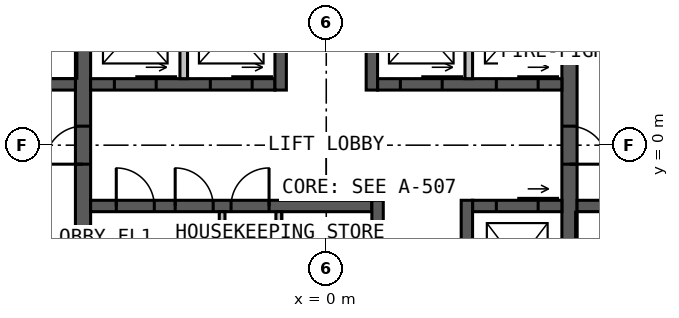
"""IFC4 building model, lengths in metres.
Left out: names, types, materials, properties, quantities, classifications, styles, units other than length and angle.
Written with IfcOpenShell. Run it as: python <this file> out.ifc"""

import sys

from ifc_helpers import new_model, si_unit, direction, frame, frame_2d, origin, place, context, subcontext, project, spatial, rectangle, extrude, element, fill, save


model = new_model("IFC4")
c1 = context("Model", 3, precision=1e-05, world=origin(), true_north=direction((0.0, 1.0)))
c2 = subcontext(c1, "Body", "Model", "MODEL_VIEW")
j1 = project(units=[si_unit("LENGTHUNIT", "METRE"), si_unit("PLANEANGLEUNIT", "RADIAN")], contexts=[c1])
p1 = place(None, origin())
s1 = spatial("IfcSite", under=j1, at=p1, CompositionType="ELEMENT")
p2 = place(p1, origin())
s2 = spatial("IfcBuilding", under=s1, at=p2, CompositionType="ELEMENT")
p3 = place(p2, frame((0.0, 0.0, 248.0)))
s3 = spatial("IfcBuildingStorey", under=s2, at=p3, CompositionType="ELEMENT", Elevation=248.0)
p4 = place(p3, frame((-6.4, -9.6, 0.0), z_axis=(0.0, 0.0, 1.0), x_axis=(0.0, 1.0, 0.0)))
e1 = element("IfcWall", 1, at=p4, inside=s3, PredefinedType="SOLIDWALL", context=c2, shape_type="SweptSolid", body=[
    extrude(rectangle(XDim=19.2, YDim=0.4, at=frame_2d((9.6, 0.0))), origin(), (0.0, 0.0, 1.0), 4.0),
])
p5 = place(p4, frame((9.1, 0.0, 0.0)))
e2 = element("IfcOpeningElement", 2, at=p5, cuts=e1, PredefinedType="OPENING", context=c2, shape_type="SweptSolid", body=[
    extrude(rectangle(XDim=1.0, YDim=2.2, at=frame_2d((0.5, 1.1))), frame((0.0, 0.21, 0.0), z_axis=(0.0, -1.0, 0.0), x_axis=(1.0, 0.0, 0.0)), (0.0, 0.0, 1.0), 0.42),
])
p6 = place(p3, frame((6.4, 9.6, 0.0), z_axis=(0.0, 0.0, 1.0), x_axis=(0.0, -1.0, 0.0)))
e3 = element("IfcWall", 3, at=p6, inside=s3, PredefinedType="SOLIDWALL", context=c2, shape_type="SweptSolid", body=[
    extrude(rectangle(XDim=19.2, YDim=0.4, at=frame_2d((9.6, 0.0))), origin(), (0.0, 0.0, 1.0), 4.0),
])
p7 = place(p6, frame((9.1, 0.0, 0.0)))
e4 = element("IfcOpeningElement", 4, at=p7, cuts=e3, PredefinedType="OPENING", context=c2, shape_type="SweptSolid", body=[
    extrude(rectangle(XDim=1.0, YDim=2.2, at=frame_2d((0.5, 1.1))), frame((0.0, 0.21, 0.0), z_axis=(0.0, -1.0, 0.0), x_axis=(1.0, 0.0, 0.0)), (0.0, 0.0, 1.0), 0.42),
])
p8 = place(p3, frame((-6.2, 1.6, 0.0), z_axis=(0.0, 0.0, 1.0), x_axis=(1.0, 0.0, 0.0)))
e5 = element("IfcWall", 5, at=p8, inside=s3, PredefinedType="SOLIDWALL", context=c2, shape_type="SweptSolid", body=[
    extrude(rectangle(XDim=4.85, YDim=0.3, at=frame_2d((2.425, 0.0))), origin(), (0.0, 0.0, 1.0), 4.0),
])
p9 = place(p8, frame((0.625, 0.0, 0.0)))
e6 = element("IfcOpeningElement", 6, at=p9, cuts=e5, PredefinedType="OPENING", context=c2, shape_type="SweptSolid", body=[
    extrude(rectangle(XDim=1.1, YDim=2.2, at=frame_2d((0.55, 1.1))), frame((0.0, 0.16, 0.0), z_axis=(0.0, -1.0, 0.0), x_axis=(1.0, 0.0, 0.0)), (0.0, 0.0, 1.0), 0.32),
])
p10 = place(p8, frame((3.15, 0.0, 0.0)))
e7 = element("IfcOpeningElement", 7, at=p10, cuts=e5, PredefinedType="OPENING", context=c2, shape_type="SweptSolid", body=[
    extrude(rectangle(XDim=1.1, YDim=2.2, at=frame_2d((0.55, 1.1))), frame((0.0, 0.16, 0.0), z_axis=(0.0, -1.0, 0.0), x_axis=(1.0, 0.0, 0.0)), (0.0, 0.0, 1.0), 0.32),
])
p11 = place(p3, frame((1.35, 1.6, 0.0), z_axis=(0.0, 0.0, 1.0), x_axis=(1.0, 0.0, 0.0)))
e8 = element("IfcWall", 8, at=p11, inside=s3, PredefinedType="SOLIDWALL", context=c2, shape_type="SweptSolid", body=[
    extrude(rectangle(XDim=4.85, YDim=0.3, at=frame_2d((2.425, 0.0))), origin(), (0.0, 0.0, 1.0), 4.0),
])
p12 = place(p11, frame((0.6, 0.0, 0.0)))
e9 = element("IfcOpeningElement", 9, at=p12, cuts=e8, PredefinedType="OPENING", context=c2, shape_type="SweptSolid", body=[
    extrude(rectangle(XDim=1.1, YDim=2.2, at=frame_2d((0.55, 1.1))), frame((0.0, 0.16, 0.0), z_axis=(0.0, -1.0, 0.0), x_axis=(1.0, 0.0, 0.0)), (0.0, 0.0, 1.0), 0.32),
])
p13 = place(p11, frame((3.125, 0.0, 0.0)))
e10 = element("IfcOpeningElement", 10, at=p13, cuts=e8, PredefinedType="OPENING", context=c2, shape_type="SweptSolid", body=[
    extrude(rectangle(XDim=1.1, YDim=2.2, at=frame_2d((0.55, 1.1))), frame((0.0, 0.16, 0.0), z_axis=(0.0, -1.0, 0.0), x_axis=(1.0, 0.0, 0.0)), (0.0, 0.0, 1.0), 0.32),
])
p14 = place(p3, frame((-1.2, 1.45, 0.0), z_axis=(0.0, 0.0, 1.0), x_axis=(0.0, 1.0, 0.0)))
e11 = element("IfcWall", 11, at=p14, inside=s3, PredefinedType="SOLIDWALL", context=c2, shape_type="SweptSolid", body=[
    extrude(rectangle(XDim=8.15, YDim=0.3, at=frame_2d((4.075, 0.0))), origin(), (0.0, 0.0, 1.0), 4.0),
])
p15 = place(p14, frame((5.05, 0.0, 0.0)))
e12 = element("IfcOpeningElement", 12, at=p15, cuts=e11, PredefinedType="OPENING", context=c2, shape_type="SweptSolid", body=[
    extrude(rectangle(XDim=1.0, YDim=2.2, at=frame_2d((0.5, 1.1))), frame((0.0, 0.16, 0.0), z_axis=(0.0, -1.0, 0.0), x_axis=(1.0, 0.0, 0.0)), (0.0, 0.0, 1.0), 0.32),
])
p16 = place(p3, frame((1.2, 1.45, 0.0), z_axis=(0.0, 0.0, 1.0), x_axis=(0.0, 1.0, 0.0)))
e13 = element("IfcWall", 13, at=p16, inside=s3, PredefinedType="SOLIDWALL", context=c2, shape_type="SweptSolid", body=[
    extrude(rectangle(XDim=8.15, YDim=0.3, at=frame_2d((4.075, 0.0))), origin(), (0.0, 0.0, 1.0), 4.0),
])
p17 = place(p16, frame((3.8, 0.0, 0.0)))
e14 = element("IfcOpeningElement", 14, at=p17, cuts=e13, PredefinedType="OPENING", context=c2, shape_type="SweptSolid", body=[
    extrude(rectangle(XDim=1.0, YDim=2.2, at=frame_2d((0.5, 1.1))), frame((0.0, 0.16, 0.0), z_axis=(0.0, -1.0, 0.0), x_axis=(1.0, 0.0, 0.0)), (0.0, 0.0, 1.0), 0.32),
])
p18 = place(p16, frame((6.15, 0.0, 0.0)))
e15 = element("IfcOpeningElement", 15, at=p18, cuts=e13, PredefinedType="OPENING", context=c2, shape_type="SweptSolid", body=[
    extrude(rectangle(XDim=1.0, YDim=2.2, at=frame_2d((0.5, 1.1))), frame((0.0, 0.16, 0.0), z_axis=(0.0, -1.0, 0.0), x_axis=(1.0, 0.0, 0.0)), (0.0, 0.0, 1.0), 0.32),
])
p19 = place(p3, frame((-6.2, -1.6, 0.0), z_axis=(0.0, 0.0, 1.0), x_axis=(1.0, 0.0, 0.0)))
e16 = element("IfcWall", 16, at=p19, inside=s3, PredefinedType="SOLIDWALL", context=c2, shape_type="SweptSolid", body=[
    extrude(rectangle(XDim=7.4, YDim=0.3, at=frame_2d((3.7, 0.0))), origin(), (0.0, 0.0, 1.0), 4.0),
])
p20 = place(p19, frame((0.675, 0.0, 0.0)))
e17 = element("IfcOpeningElement", 17, at=p20, cuts=e16, PredefinedType="OPENING", context=c2, shape_type="SweptSolid", body=[
    extrude(rectangle(XDim=1.0, YDim=2.2, at=frame_2d((0.5, 1.1))), frame((0.0, 0.16, 0.0), z_axis=(0.0, -1.0, 0.0), x_axis=(1.0, 0.0, 0.0)), (0.0, 0.0, 1.0), 0.32),
])
p21 = place(p19, frame((2.225, 0.0, 0.0)))
e18 = element("IfcOpeningElement", 18, at=p21, cuts=e16, PredefinedType="OPENING", context=c2, shape_type="SweptSolid", body=[
    extrude(rectangle(XDim=1.0, YDim=2.2, at=frame_2d((0.5, 1.1))), frame((0.0, 0.16, 0.0), z_axis=(0.0, -1.0, 0.0), x_axis=(1.0, 0.0, 0.0)), (0.0, 0.0, 1.0), 0.32),
])
p22 = place(p19, frame((3.695, 0.0, 0.0)))
e19 = element("IfcOpeningElement", 19, at=p22, cuts=e16, PredefinedType="OPENING", context=c2, shape_type="SweptSolid", body=[
    extrude(rectangle(XDim=1.0, YDim=2.2, at=frame_2d((0.5, 1.1))), frame((0.0, 0.16, 0.0), z_axis=(0.0, -1.0, 0.0), x_axis=(1.0, 0.0, 0.0)), (0.0, 0.0, 1.0), 0.32),
])
p23 = place(p3, frame((3.85, -1.6, 0.0), z_axis=(0.0, 0.0, 1.0), x_axis=(1.0, 0.0, 0.0)))
e20 = element("IfcWall", 20, at=p23, inside=s3, PredefinedType="SOLIDWALL", context=c2, shape_type="SweptSolid", body=[
    extrude(rectangle(XDim=2.35, YDim=0.3, at=frame_2d((1.175, 0.0))), origin(), (0.0, 0.0, 1.0), 4.0),
])
p24 = place(p23, frame((0.625, 0.0, 0.0)))
e21 = element("IfcOpeningElement", 21, at=p24, cuts=e20, PredefinedType="OPENING", context=c2, shape_type="SweptSolid", body=[
    extrude(rectangle(XDim=1.1, YDim=2.2, at=frame_2d((0.55, 1.1))), frame((0.0, 0.16, 0.0), z_axis=(0.0, -1.0, 0.0), x_axis=(1.0, 0.0, 0.0)), (0.0, 0.0, 1.0), 0.32),
])
p25 = place(p3, frame((1.35, -1.45, 0.0), z_axis=(0.0, 0.0, 1.0), x_axis=(0.0, -1.0, 0.0)))
e22 = element("IfcWall", 22, at=p25, inside=s3, PredefinedType="SOLIDWALL", context=c2, shape_type="SweptSolid", body=[
    extrude(rectangle(XDim=8.15, YDim=0.3, at=frame_2d((4.075, 0.0))), origin(), (0.0, 0.0, 1.0), 4.0),
])
p26 = place(p25, frame((6.0, 0.0, 0.0)))
e23 = element("IfcOpeningElement", 23, at=p26, cuts=e22, PredefinedType="OPENING", context=c2, shape_type="SweptSolid", body=[
    extrude(rectangle(XDim=1.0, YDim=2.2, at=frame_2d((0.5, 1.1))), frame((0.0, 0.16, 0.0), z_axis=(0.0, -1.0, 0.0), x_axis=(1.0, 0.0, 0.0)), (0.0, 0.0, 1.0), 0.32),
])
p27 = place(p25, frame((3.525, 0.0, 0.0)))
e24 = element("IfcOpeningElement", 24, at=p27, cuts=e22, PredefinedType="OPENING", context=c2, shape_type="SweptSolid", body=[
    extrude(rectangle(XDim=0.9, YDim=2.2, at=frame_2d((0.45, 1.1))), frame((0.0, 0.16, 0.0), z_axis=(0.0, -1.0, 0.0), x_axis=(1.0, 0.0, 0.0)), (0.0, 0.0, 1.0), 0.32),
])
p28 = place(p3, frame((3.7, -1.45, 0.0), z_axis=(0.0, 0.0, 1.0), x_axis=(0.0, -1.0, 0.0)))
e25 = element("IfcWall", 25, at=p28, inside=s3, PredefinedType="SOLIDWALL", context=c2, shape_type="SweptSolid", body=[
    extrude(rectangle(XDim=8.15, YDim=0.3, at=frame_2d((4.075, 0.0))), origin(), (0.0, 0.0, 1.0), 4.0),
])
p29 = place(p28, frame((5.1, 0.0, 0.0)))
e26 = element("IfcOpeningElement", 26, at=p29, cuts=e25, PredefinedType="OPENING", context=c2, shape_type="SweptSolid", body=[
    extrude(rectangle(XDim=0.9, YDim=2.2, at=frame_2d((0.45, 1.1))), frame((0.0, 0.16, 0.0), z_axis=(0.0, -1.0, 0.0), x_axis=(1.0, 0.0, 0.0)), (0.0, 0.0, 1.0), 0.32),
])
p30 = place(p3, frame((-9.6, 1.6, 0.0), z_axis=(0.0, 0.0, 1.0), x_axis=(1.0, 0.0, 0.0)))
e27 = element("IfcWall", 27, at=p30, inside=s3, PredefinedType="SOLIDWALL", context=c2, shape_type="SweptSolid", body=[
    extrude(rectangle(XDim=3.0, YDim=0.3, at=frame_2d((1.5, 0.0))), origin(), (0.0, 0.0, 1.0), 4.0),
])
p31 = place(p30, frame((1.0, 0.0, 0.0)))
e28 = element("IfcOpeningElement", 28, at=p31, cuts=e27, PredefinedType="OPENING", context=c2, shape_type="SweptSolid", body=[
    extrude(rectangle(XDim=1.0, YDim=2.2, at=frame_2d((0.5, 1.1))), frame((0.0, 0.16, 0.0), z_axis=(0.0, -1.0, 0.0), x_axis=(1.0, 0.0, 0.0)), (0.0, 0.0, 1.0), 0.32),
])
p32 = place(p3, frame((6.6, -1.6, 0.0), z_axis=(0.0, 0.0, 1.0), x_axis=(1.0, 0.0, 0.0)))
e29 = element("IfcWall", 29, at=p32, inside=s3, PredefinedType="SOLIDWALL", context=c2, shape_type="SweptSolid", body=[
    extrude(rectangle(XDim=3.0, YDim=0.3, at=frame_2d((1.5, 0.0))), origin(), (0.0, 0.0, 1.0), 4.0),
])
p33 = place(p32, frame((1.0, 0.0, 0.0)))
e30 = element("IfcOpeningElement", 30, at=p33, cuts=e29, PredefinedType="OPENING", context=c2, shape_type="SweptSolid", body=[
    extrude(rectangle(XDim=1.0, YDim=2.2, at=frame_2d((0.5, 1.1))), frame((0.0, 0.16, 0.0), z_axis=(0.0, -1.0, 0.0), x_axis=(1.0, 0.0, 0.0)), (0.0, 0.0, 1.0), 0.32),
])
for number, where, z_axis, x_axis in (
    (31, (-3.75, 1.75, 0.0), (0.0, 0.0, 1.0), (0.0, 1.0, 0.0)),
    (32, (3.75, 1.75, 0.0), (0.0, 0.0, 1.0), (0.0, 1.0, 0.0)),
):
    element("IfcWall", number, at=place(p3, frame(where, z_axis=z_axis, x_axis=x_axis)), inside=s3, PredefinedType="SOLIDWALL", context=c2, shape_type="SweptSolid", body=[
        extrude(rectangle(XDim=2.7, YDim=0.2, at=frame_2d((1.35, 0.0))), origin(), (0.0, 0.0, 1.0), 3.75),
    ])
for number, where, z_axis, x_axis in (
    (33, (-2.74, -1.75, 0.0), (0.0, 0.0, 1.0), (0.0, -1.0, 0.0)),
    (34, (-1.25, -1.75, 0.0), (0.0, 0.0, 1.0), (0.0, -1.0, 0.0)),
):
    element("IfcWall", number, at=place(p3, frame(where, z_axis=z_axis, x_axis=x_axis)), inside=s3, PredefinedType="PARTITIONING", context=c2, shape_type="SweptSolid", body=[
        extrude(rectangle(XDim=2.7, YDim=0.15, at=frame_2d((1.35, 0.0))), origin(), (0.0, 0.0, 1.0), 3.75),
    ])
p34 = place(p5, origin())
e35 = element("IfcDoor", 35, at=p34, inside=s3, OperationType="SINGLE_SWING_LEFT", PredefinedType="DOOR", context=c2, shape_type="SweptSolid", body=[
    extrude(rectangle(XDim=1.0, YDim=2.2, at=frame_2d((0.5, 1.1))), frame((0.0, 0.025, 0.0), z_axis=(0.0, -1.0, 0.0), x_axis=(1.0, 0.0, 0.0)), (0.0, 0.0, 1.0), 0.05),
])
fill(e2, e35)
p35 = place(p7, origin())
e36 = element("IfcDoor", 36, at=p35, inside=s3, OperationType="SINGLE_SWING_RIGHT", PredefinedType="DOOR", context=c2, shape_type="SweptSolid", body=[
    extrude(rectangle(XDim=1.0, YDim=2.2, at=frame_2d((0.5, 1.1))), frame((0.0, 0.025, 0.0), z_axis=(0.0, -1.0, 0.0), x_axis=(1.0, 0.0, 0.0)), (0.0, 0.0, 1.0), 0.05),
])
fill(e4, e36)
p36 = place(p20, origin())
e37 = element("IfcDoor", 37, at=p36, inside=s3, OperationType="SINGLE_SWING_LEFT", PredefinedType="DOOR", context=c2, shape_type="SweptSolid", body=[
    extrude(rectangle(XDim=1.0, YDim=2.2, at=frame_2d((0.5, 1.1))), frame((0.0, 0.025, 0.0), z_axis=(0.0, -1.0, 0.0), x_axis=(1.0, 0.0, 0.0)), (0.0, 0.0, 1.0), 0.05),
])
fill(e17, e37)
p37 = place(p21, origin())
e38 = element("IfcDoor", 38, at=p37, inside=s3, OperationType="SINGLE_SWING_LEFT", PredefinedType="DOOR", context=c2, shape_type="SweptSolid", body=[
    extrude(rectangle(XDim=1.0, YDim=2.2, at=frame_2d((0.5, 1.1))), frame((0.0, 0.025, 0.0), z_axis=(0.0, -1.0, 0.0), x_axis=(1.0, 0.0, 0.0)), (0.0, 0.0, 1.0), 0.05),
])
fill(e18, e38)
p38 = place(p22, origin())
e39 = element("IfcDoor", 39, at=p38, inside=s3, OperationType="SINGLE_SWING_RIGHT", PredefinedType="DOOR", context=c2, shape_type="SweptSolid", body=[
    extrude(rectangle(XDim=1.0, YDim=2.2, at=frame_2d((0.5, 1.1))), frame((0.0, 0.025, 0.0), z_axis=(0.0, -1.0, 0.0), x_axis=(1.0, 0.0, 0.0)), (0.0, 0.0, 1.0), 0.05),
])
fill(e19, e39)
p39 = place(p9, origin())
e40 = element("IfcDoor", 40, at=p39, inside=s3, OperationType="SLIDING_TO_LEFT", PredefinedType="DOOR", context=c2, shape_type="SweptSolid", body=[
    extrude(rectangle(XDim=1.1, YDim=2.2, at=frame_2d((0.55, 1.1))), frame((0.0, 0.025, 0.0), z_axis=(0.0, -1.0, 0.0), x_axis=(1.0, 0.0, 0.0)), (0.0, 0.0, 1.0), 0.05),
])
fill(e6, e40)
p40 = place(p10, origin())
e41 = element("IfcDoor", 41, at=p40, inside=s3, OperationType="SLIDING_TO_LEFT", PredefinedType="DOOR", context=c2, shape_type="SweptSolid", body=[
    extrude(rectangle(XDim=1.1, YDim=2.2, at=frame_2d((0.55, 1.1))), frame((0.0, 0.025, 0.0), z_axis=(0.0, -1.0, 0.0), x_axis=(1.0, 0.0, 0.0)), (0.0, 0.0, 1.0), 0.05),
])
fill(e7, e41)
p41 = place(p12, origin())
e42 = element("IfcDoor", 42, at=p41, inside=s3, OperationType="SLIDING_TO_LEFT", PredefinedType="DOOR", context=c2, shape_type="SweptSolid", body=[
    extrude(rectangle(XDim=1.1, YDim=2.2, at=frame_2d((0.55, 1.1))), frame((0.0, 0.025, 0.0), z_axis=(0.0, -1.0, 0.0), x_axis=(1.0, 0.0, 0.0)), (0.0, 0.0, 1.0), 0.05),
])
fill(e9, e42)
p42 = place(p13, origin())
e43 = element("IfcDoor", 43, at=p42, inside=s3, OperationType="SLIDING_TO_LEFT", PredefinedType="DOOR", context=c2, shape_type="SweptSolid", body=[
    extrude(rectangle(XDim=1.1, YDim=2.2, at=frame_2d((0.55, 1.1))), frame((0.0, 0.025, 0.0), z_axis=(0.0, -1.0, 0.0), x_axis=(1.0, 0.0, 0.0)), (0.0, 0.0, 1.0), 0.05),
])
fill(e10, e43)
p43 = place(p24, origin())
e44 = element("IfcDoor", 44, at=p43, inside=s3, OperationType="SLIDING_TO_LEFT", PredefinedType="DOOR", context=c2, shape_type="SweptSolid", body=[
    extrude(rectangle(XDim=1.1, YDim=2.2, at=frame_2d((0.55, 1.1))), frame((0.0, 0.025, 0.0), z_axis=(0.0, -1.0, 0.0), x_axis=(1.0, 0.0, 0.0)), (0.0, 0.0, 1.0), 0.05),
])
fill(e21, e44)
save(model, sys.argv[1])
